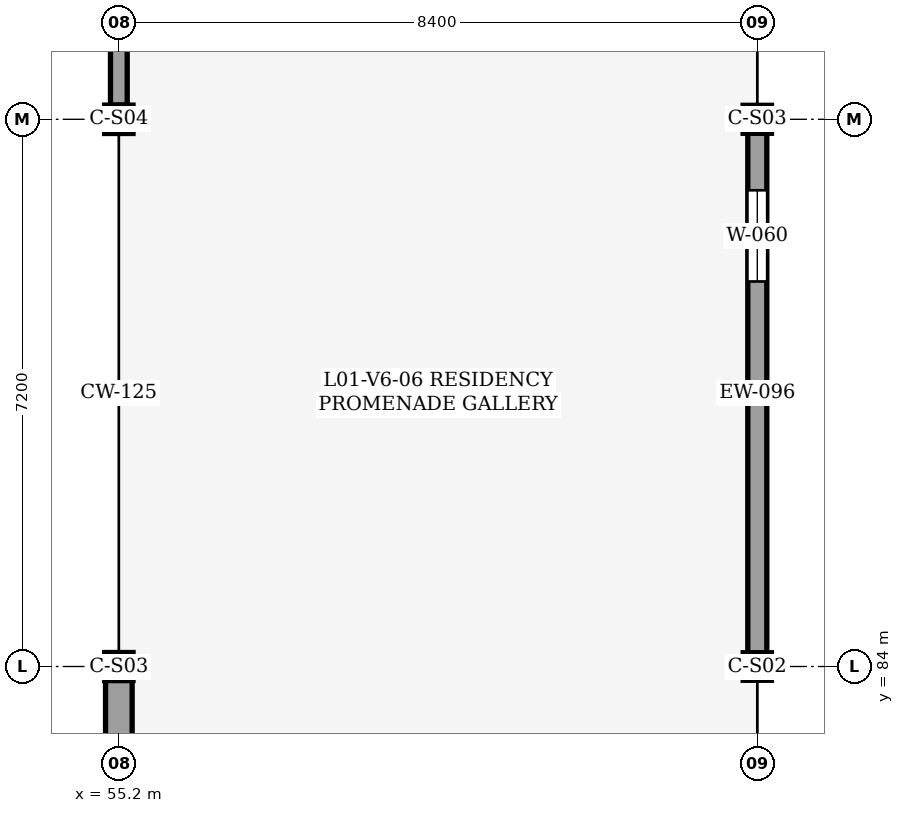
"""IFC4 building model, lengths in metres.
Left out: names, types, materials, properties, quantities, classifications, styles, units other than length and angle.
Written with IfcOpenShell. Run it as: python <this file> out.ifc"""

import sys

from ifc_helpers import new_model, si_unit, direction, frame, frame_2d, origin, origin_2d, place, context, subcontext, project, spatial, rectangle, i_section, extrude, element, fill, save


model = new_model("IFC4")
c1 = context("Model", 3, precision=1e-05, world=origin(), true_north=direction((0.0, 1.0)))
c2 = subcontext(c1, "Body", "Model", "MODEL_VIEW")
j1 = project(units=[si_unit("LENGTHUNIT", "METRE"), si_unit("PLANEANGLEUNIT", "RADIAN")], contexts=[c1])
p1 = place(None, origin())
s1 = spatial("IfcSite", under=j1, at=p1, CompositionType="ELEMENT")
p2 = place(p1, origin())
s2 = spatial("IfcBuilding", under=s1, at=p2, CompositionType="ELEMENT")
p3 = place(p2, frame((0.0, 0.0, 5.4)))
s3 = spatial("IfcBuildingStorey", under=s2, at=p3, CompositionType="ELEMENT", Elevation=5.4)
p4 = place(p3, frame((55.2, 84.0, 0.0), z_axis=(0.0, 0.0, 1.0), x_axis=(1.0, 0.0, 0.0)))
e1 = element("IfcColumn", 1, at=p4, inside=s3, PredefinedType="COLUMN", context=c2, shape_type="SweptSolid", body=[
    extrude(i_section(OverallWidth=0.373, OverallDepth=0.368, WebThickness=0.015, FlangeThickness=0.024, FilletRadius=0.025, at=origin_2d()), origin(), (0.0, 0.0, 1.0), 4.8),
])
p5 = place(p3, frame((55.2, 91.2, 0.0), z_axis=(0.0, 0.0, 1.0), x_axis=(1.0, 0.0, 0.0)))
e2 = element("IfcColumn", 2, at=p5, inside=s3, PredefinedType="COLUMN", context=c2, shape_type="SweptSolid", body=[
    extrude(i_section(OverallWidth=0.373, OverallDepth=0.373, WebThickness=0.016, FlangeThickness=0.026, FilletRadius=0.025, at=origin_2d()), origin(), (0.0, 0.0, 1.0), 4.8),
])
p6 = place(p3, frame((63.6, 84.0, 0.0), z_axis=(0.0, 0.0, 1.0), x_axis=(1.0, 0.0, 0.0)))
e3 = element("IfcColumn", 3, at=p6, inside=s3, PredefinedType="COLUMN", context=c2, shape_type="SweptSolid", body=[
    extrude(i_section(OverallWidth=0.371, OverallDepth=0.363, WebThickness=0.013, FlangeThickness=0.022, FilletRadius=0.025, at=origin_2d()), origin(), (0.0, 0.0, 1.0), 4.8),
])
p7 = place(p3, frame((63.6, 91.2, 0.0), z_axis=(0.0, 0.0, 1.0), x_axis=(1.0, 0.0, 0.0)))
e4 = element("IfcColumn", 4, at=p7, inside=s3, PredefinedType="COLUMN", context=c2, shape_type="SweptSolid", body=[
    extrude(i_section(OverallWidth=0.373, OverallDepth=0.368, WebThickness=0.015, FlangeThickness=0.024, FilletRadius=0.025, at=origin_2d()), origin(), (0.0, 0.0, 1.0), 4.8),
])
p8 = place(p3, frame((55.2, 76.981, 0.0), z_axis=(0.0, 0.0, 1.0), x_axis=(0.0, 1.0, 0.0)))
e5 = element("IfcWall", 5, at=p8, inside=s3, PredefinedType="SOLIDWALL", context=c2, shape_type="SweptSolid", body=[
    extrude(rectangle(XDim=6.834, YDim=0.35, at=frame_2d((3.417, 0.0))), origin(), (0.0, 0.0, 1.0), 3.908),
])
p9 = place(p8, frame((0.75, 0.0, 0.9)))
e6 = element("IfcOpeningElement", 6, at=p9, cuts=e5, PredefinedType="OPENING", context=c2, shape_type="SweptSolid", body=[
    extrude(rectangle(XDim=1.2, YDim=1.5, at=frame_2d((0.6, 0.75))), frame((0.0, 0.185, 0.0), z_axis=(0.0, -1.0, 0.0), x_axis=(1.0, 0.0, 0.0)), (0.0, 0.0, 1.0), 0.371),
])
p10 = place(p3, frame((55.2, 91.386, 0.0), z_axis=(0.0, 0.0, 1.0), x_axis=(0.0, 1.0, 0.0)))
e7 = element("IfcWall", 7, at=p10, inside=s3, PredefinedType="SOLIDWALL", context=c2, shape_type="SweptSolid", body=[
    extrude(rectangle(XDim=6.835, YDim=0.22, at=frame_2d((3.418, 0.0))), origin(), (0.0, 0.0, 1.0), 3.987),
])
p11 = place(p10, frame((0.75, 0.0, 0.9)))
e8 = element("IfcOpeningElement", 8, at=p11, cuts=e7, PredefinedType="OPENING", context=c2, shape_type="SweptSolid", body=[
    extrude(rectangle(XDim=1.2, YDim=1.5, at=frame_2d((0.6, 0.75))), frame((0.0, 0.12, 0.0), z_axis=(0.0, -1.0, 0.0), x_axis=(1.0, 0.0, 0.0)), (0.0, 0.0, 1.0), 0.24),
])
p12 = place(p3, frame((63.6, 91.016, 0.0), z_axis=(0.0, 0.0, 1.0), x_axis=(0.0, -1.0, 0.0)))
e9 = element("IfcWall", 9, at=p12, inside=s3, PredefinedType="SOLIDWALL", context=c2, shape_type="SweptSolid", body=[
    extrude(rectangle(XDim=6.835, YDim=0.25, at=frame_2d((3.417, 0.0))), origin(), (0.0, 0.0, 1.0), 3.987),
])
p13 = place(p12, frame((0.75, 0.0, 0.9)))
e10 = element("IfcOpeningElement", 10, at=p13, cuts=e9, PredefinedType="OPENING", context=c2, shape_type="SweptSolid", body=[
    extrude(rectangle(XDim=1.2, YDim=1.5, at=frame_2d((0.6, 0.75))), frame((0.0, 0.135, 0.0), z_axis=(0.0, -1.0, 0.0), x_axis=(1.0, 0.0, 0.0)), (0.0, 0.0, 1.0), 0.271),
])
p14 = place(p13, origin())
e11 = element("IfcWindow", 11, at=p14, inside=s3, PartitioningType="SINGLE_PANEL", PredefinedType="WINDOW", context=c2, shape_type="SweptSolid", body=[
    extrude(rectangle(XDim=1.2, YDim=1.5, at=frame_2d((0.6, 0.75))), frame((0.0, 0.03, 0.0), z_axis=(0.0, -1.0, 0.0), x_axis=(1.0, 0.0, 0.0)), (0.0, 0.0, 1.0), 0.06),
])
fill(e10, e11)
save(model, sys.argv[1])
